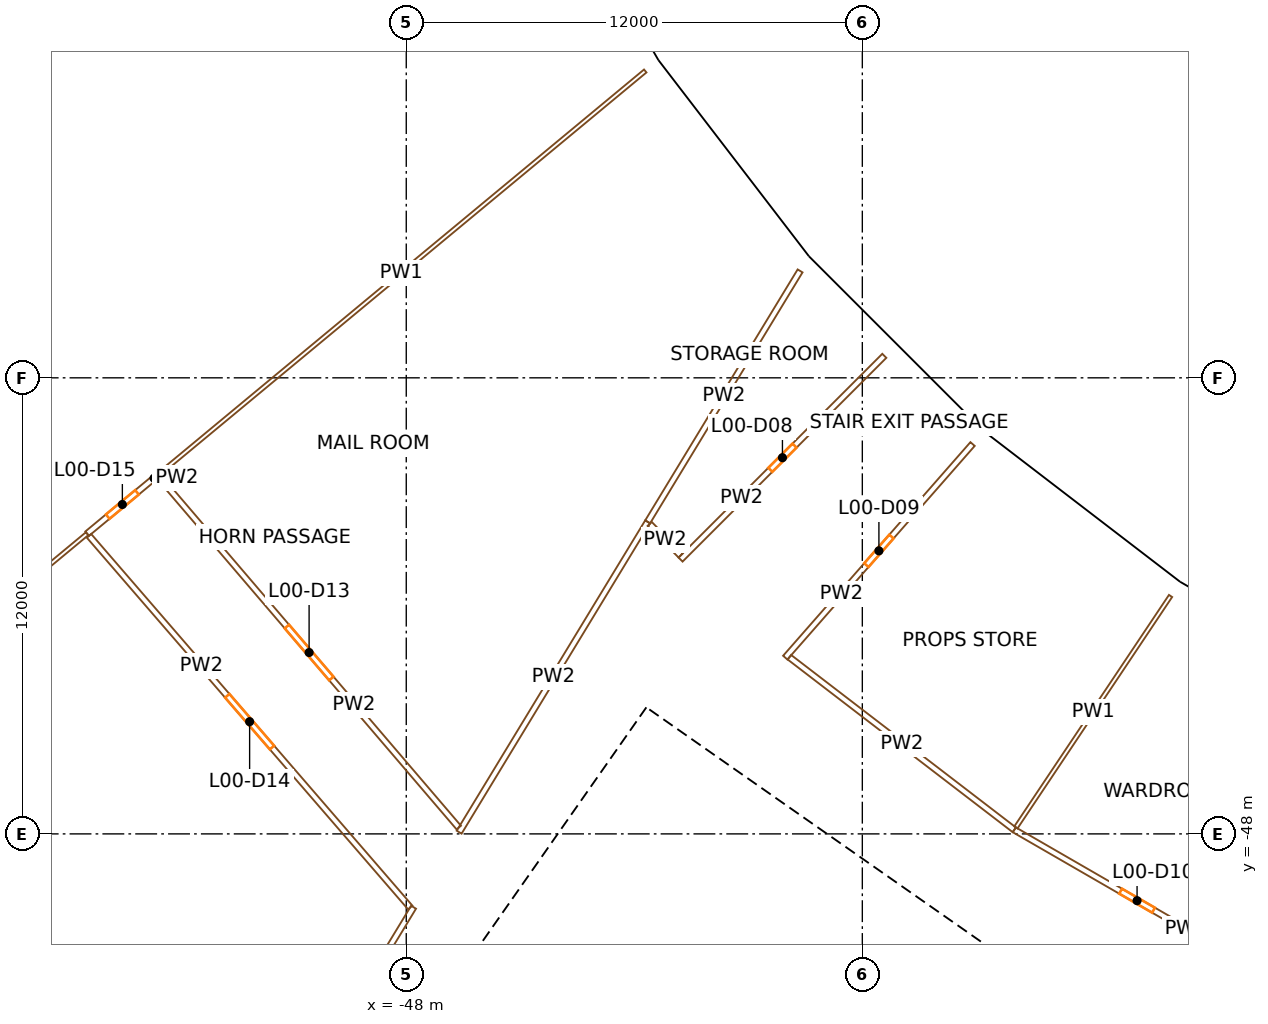
"""IFC4 building model, lengths in metres.
Left out: names, types, materials, properties, quantities, classifications, styles, units other than length and angle.
Written with IfcOpenShell. Run it as: python <this file> out.ifc"""

import sys

from ifc_helpers import new_model, si_unit, direction, frame, frame_2d, origin, origin_2d, place, context, subcontext, project, spatial, rectangle, extrude, element, fill, save


model = new_model("IFC4")
c1 = context("Model", 3, precision=1e-05, world=origin(), true_north=direction((0.0, 1.0)))
c2 = subcontext(c1, "Body", "Model", "MODEL_VIEW")
j1 = project(units=[si_unit("LENGTHUNIT", "METRE"), si_unit("PLANEANGLEUNIT", "RADIAN")], contexts=[c1])
p1 = place(None, origin())
s1 = spatial("IfcSite", under=j1, at=p1, CompositionType="ELEMENT")
p2 = place(p1, origin())
s2 = spatial("IfcBuilding", under=s1, at=p2, CompositionType="ELEMENT")
p3 = place(p2, origin())
s3 = spatial("IfcBuildingStorey", under=s2, at=p3, CompositionType="ELEMENT", Elevation=0.0)
p4 = place(p3, frame((-42.197, -28.195, -0.4), z_axis=(0.0, 0.0, 1.0), x_axis=(0.55557023302, -0.831469612303, 0.0)))
e1 = element("IfcColumn", 1, at=p4, inside=s3, PredefinedType="COLUMN", context=c2, shape_type="SweptSolid", body=[
    extrude(rectangle(XDim=1.1, YDim=1.3, at=origin_2d()), origin(), (0.0, 0.0, 1.0), 9.4),
])
p5 = place(p3, frame((-48.433, -32.362, -0.4), z_axis=(0.0, 0.0, 1.0), x_axis=(0.55557023302, -0.831469612303, 0.0)))
e2 = element("IfcColumn", 2, at=p5, inside=s3, PredefinedType="COLUMN", context=c2, shape_type="SweptSolid", body=[
    extrude(rectangle(XDim=1.4, YDim=1.8, at=origin_2d()), origin(), (0.0, 0.0, 1.0), 9.4),
])
p6 = place(p3, frame((-38.156, -33.462, -0.4), z_axis=(0.0, 0.0, 1.0), x_axis=(0.6593458151, -0.751839807479, 0.0)))
e3 = element("IfcColumn", 3, at=p6, inside=s3, PredefinedType="COLUMN", context=c2, shape_type="SweptSolid", body=[
    extrude(rectangle(XDim=1.1, YDim=1.3, at=origin_2d()), origin(), (0.0, 0.0, 1.0), 9.4),
])
for number, where, z_axis, x_axis in (
    (4, (-43.795, -38.407, -0.4), (0.0, 0.0, 1.0), (0.659, -0.752, 0.0)),
    (5, (-58.456, -51.264, -0.4), (0.0, 0.0, 1.0), (0.659, -0.752, 0.0)),
):
    element("IfcColumn", number, at=place(p3, frame(where, z_axis=z_axis, x_axis=x_axis)), inside=s3, PredefinedType="COLUMN", context=c2, shape_type="SweptSolid", body=[
        extrude(rectangle(XDim=1.4, YDim=1.8, at=origin_2d()), origin(), (0.0, 0.0, 1.0), 9.4),
    ])
p7 = place(p3, frame((-33.462, -38.156, -0.4), z_axis=(0.0, 0.0, 1.0), x_axis=(0.751839807479, -0.6593458151, 0.0)))
e6 = element("IfcColumn", 6, at=p7, inside=s3, PredefinedType="COLUMN", context=c2, shape_type="SweptSolid", body=[
    extrude(rectangle(XDim=1.1, YDim=1.3, at=origin_2d()), origin(), (0.0, 0.0, 1.0), 9.4),
])
p8 = place(p3, frame((-38.407, -43.795, -0.4), z_axis=(0.0, 0.0, 1.0), x_axis=(0.751839807479, -0.6593458151, 0.0)))
e7 = element("IfcColumn", 7, at=p8, inside=s3, PredefinedType="COLUMN", context=c2, shape_type="SweptSolid", body=[
    extrude(rectangle(XDim=1.4, YDim=1.8, at=origin_2d()), origin(), (0.0, 0.0, 1.0), 9.4),
])
p9 = place(p3, frame((-28.195, -42.197, -0.4), z_axis=(0.0, 0.0, 1.0), x_axis=(0.831469612303, -0.55557023302, 0.0)))
e8 = element("IfcColumn", 8, at=p9, inside=s3, PredefinedType="COLUMN", context=c2, shape_type="SweptSolid", body=[
    extrude(rectangle(XDim=1.1, YDim=1.3, at=origin_2d()), origin(), (0.0, 0.0, 1.0), 9.4),
])
p10 = place(p3, frame((-32.362, -48.433, -0.4), z_axis=(0.0, 0.0, 1.0), x_axis=(0.831469612303, -0.55557023302, 0.0)))
e9 = element("IfcColumn", 9, at=p10, inside=s3, PredefinedType="COLUMN", context=c2, shape_type="SweptSolid", body=[
    extrude(rectangle(XDim=1.4, YDim=1.8, at=origin_2d()), origin(), (0.0, 0.0, 1.0), 9.4),
])
p11 = place(p3, frame((-49.779, -57.191, 0.0), z_axis=(0.0, 0.0, 1.0), x_axis=(0.573577477574, 0.819151315216, 0.0)))
e10 = element("IfcWall", 10, at=p11, inside=s3, PredefinedType="SHEAR", context=c2, shape_type="SweptSolid", body=[
    extrude(rectangle(XDim=14.8, YDim=0.9, at=frame_2d((7.4, 0.0))), origin(), (0.0, 0.0, 1.0), 8.6),
])
p12 = place(p11, frame((6.7, 0.0, 0.0)))
e11 = element("IfcOpeningElement", 11, at=p12, cuts=e10, PredefinedType="OPENING", context=c2, shape_type="SweptSolid", body=[
    extrude(rectangle(XDim=1.4, YDim=2.1, at=frame_2d((0.7, 1.05))), frame((0.0, 0.46, 0.0), z_axis=(0.0, -1.0, 0.0), x_axis=(1.0, 0.0, 0.0)), (0.0, 0.0, 1.0), 0.92),
])
p13 = place(p3, frame((-28.854, -54.324, 0.0), z_axis=(0.0, 0.0, 1.0), x_axis=(-0.819145767589, 0.573585400304, 0.0)))
e12 = element("IfcWall", 12, at=p13, inside=s3, PredefinedType="SHEAR", context=c2, shape_type="SweptSolid", body=[
    extrude(rectangle(XDim=15.045, YDim=0.9, at=frame_2d((7.523, 0.0))), origin(), (0.0, 0.0, 1.0), 8.6),
])
p14 = place(p13, frame((0.85, 0.0, 0.0)))
e13 = element("IfcOpeningElement", 13, at=p14, cuts=e12, PredefinedType="OPENING", context=c2, shape_type="SweptSolid", body=[
    extrude(rectangle(XDim=1.0, YDim=2.1, at=frame_2d((0.5, 1.05))), frame((0.0, 0.46, 0.0), z_axis=(0.0, -1.0, 0.0), x_axis=(1.0, 0.0, 0.0)), (0.0, 0.0, 1.0), 0.92),
])
p15 = place(p13, frame((3.575, 0.0, 0.0)))
e14 = element("IfcOpeningElement", 14, at=p15, cuts=e12, PredefinedType="OPENING", context=c2, shape_type="SweptSolid", body=[
    extrude(rectangle(XDim=1.0, YDim=2.1, at=frame_2d((0.5, 1.05))), frame((0.0, 0.46, 0.0), z_axis=(0.0, -1.0, 0.0), x_axis=(1.0, 0.0, 0.0)), (0.0, 0.0, 1.0), 0.92),
])
p16 = place(p13, frame((6.275, 0.0, 0.0)))
e15 = element("IfcOpeningElement", 15, at=p16, cuts=e12, PredefinedType="OPENING", context=c2, shape_type="SweptSolid", body=[
    extrude(rectangle(XDim=0.9, YDim=2.1, at=frame_2d((0.45, 1.05))), frame((0.0, 0.46, 0.0), z_axis=(0.0, -1.0, 0.0), x_axis=(1.0, 0.0, 0.0)), (0.0, 0.0, 1.0), 0.92),
])
p17 = place(p13, frame((13.495, 0.0, 0.0)))
e16 = element("IfcOpeningElement", 16, at=p17, cuts=e12, PredefinedType="OPENING", context=c2, shape_type="SweptSolid", body=[
    extrude(rectangle(XDim=1.1, YDim=2.1, at=frame_2d((0.55, 1.05))), frame((0.0, 0.46, 0.0), z_axis=(0.0, -1.0, 0.0), x_axis=(1.0, 0.0, 0.0)), (0.0, 0.0, 1.0), 0.92),
])
p18 = place(p3, frame((-43.204, -60.696, 0.0), z_axis=(0.0, 0.0, 1.0), x_axis=(0.573571992966, 0.819155155563, 0.0)))
e17 = element("IfcWall", 17, at=p18, inside=s3, PredefinedType="SOLIDWALL", context=c2, shape_type="SweptSolid", body=[
    extrude(rectangle(XDim=13.0, YDim=0.3, at=frame_2d((6.5, 0.0))), origin(), (0.0, 0.0, 1.0), 8.6),
])
p19 = place(p3, frame((-37.936, -52.91, 0.0), z_axis=(0.0, 0.0, 1.0), x_axis=(-0.819147518138, 0.57358290031, 0.0)))
e18 = element("IfcWall", 18, at=p19, inside=s3, PredefinedType="SOLIDWALL", context=c2, shape_type="SweptSolid", body=[
    extrude(rectangle(XDim=6.795, YDim=0.3, at=frame_2d((3.398, 0.0))), origin(), (0.0, 0.0, 1.0), 8.6),
])
p20 = place(p19, frame((5.32, 0.0, 0.0)))
e19 = element("IfcOpeningElement", 19, at=p20, cuts=e18, PredefinedType="OPENING", context=c2, shape_type="SweptSolid", body=[
    extrude(rectangle(XDim=1.1, YDim=2.1, at=frame_2d((0.55, 1.05))), frame((0.0, 0.16, 0.0), z_axis=(0.0, -1.0, 0.0), x_axis=(1.0, 0.0, 0.0)), (0.0, 0.0, 1.0), 0.32),
])
p21 = place(p3, frame((-41.587, -48.369, 0.0), z_axis=(0.0, 0.0, 1.0), x_axis=(0.573495128918, 0.819208970354, 0.0)))
e20 = element("IfcWall", 20, at=p21, inside=s3, PredefinedType="SOLIDWALL", context=c2, shape_type="SweptSolid", body=[
    extrude(rectangle(XDim=0.5, YDim=0.3, at=frame_2d((0.25, 0.0))), origin(), (0.0, 0.0, 1.0), 4.3),
])
p22 = place(p3, frame((-41.583, -27.714, 0.0), z_axis=(0.0, 0.0, 1.0), x_axis=(-0.50000447882, 0.866022817921, 0.0)))
e21 = element("IfcWall", 21, at=p22, inside=s3, PredefinedType="SOLIDWALL", context=c2, shape_type="SweptSolid", body=[
    extrude(rectangle(XDim=6.419, YDim=0.45, at=frame_2d((3.21, 0.0))), origin(), (0.0, 0.0, 1.0), 7.7),
])
p23 = place(p3, frame((-37.555, -32.975, 0.0), z_axis=(0.0, 0.0, 1.0), x_axis=(-0.608780327927, 0.793338838284, 0.0)))
e22 = element("IfcWall", 22, at=p23, inside=s3, PredefinedType="SOLIDWALL", context=c2, shape_type="SweptSolid", body=[
    extrude(rectangle(XDim=6.597, YDim=0.45, at=frame_2d((3.298, 0.0))), origin(), (0.0, 0.0, 1.0), 7.7),
])
p24 = place(p23, frame((2.398, 0.0, 0.0)))
e23 = element("IfcOpeningElement", 23, at=p24, cuts=e22, PredefinedType="OPENING", context=c2, shape_type="SweptSolid", body=[
    extrude(rectangle(XDim=1.8, YDim=2.4, at=frame_2d((0.9, 1.2))), frame((0.0, 0.235, 0.0), z_axis=(0.0, -1.0, 0.0), x_axis=(1.0, 0.0, 0.0)), (0.0, 0.0, 1.0), 0.47),
])
p25 = place(p3, frame((-32.993, -37.532, 0.0), z_axis=(0.0, 0.0, 1.0), x_axis=(-0.707106781187, 0.707106781187, 0.0)))
e24 = element("IfcWall", 24, at=p25, inside=s3, PredefinedType="SOLIDWALL", context=c2, shape_type="SweptSolid", body=[
    extrude(rectangle(XDim=6.419, YDim=0.45, at=frame_2d((3.209, 0.0))), origin(), (0.0, 0.0, 1.0), 7.7),
])
p26 = place(p25, frame((1.679, 0.0, 0.0), z_axis=(0.0, 0.0, 1.0), x_axis=(-1.0, 0.0, 0.0)))
e25 = element("IfcOpeningElement", 25, at=p26, cuts=e24, PredefinedType="OPENING", context=c2, shape_type="SweptSolid", body=[
    extrude(rectangle(XDim=1.2, YDim=2.4, at=frame_2d((0.6, 1.2))), frame((0.0, 0.235, 0.0), z_axis=(0.0, -1.0, 0.0), x_axis=(1.0, 0.0, 0.0)), (0.0, 0.0, 1.0), 0.47),
])
p27 = place(p3, frame((-27.741, -41.571, 0.0), z_axis=(0.0, 0.0, 1.0), x_axis=(-0.793338838284, 0.608780327927, 0.0)))
e26 = element("IfcWall", 26, at=p27, inside=s3, PredefinedType="SOLIDWALL", context=c2, shape_type="SweptSolid", body=[
    extrude(rectangle(XDim=6.597, YDim=0.45, at=frame_2d((3.298, 0.0))), origin(), (0.0, 0.0, 1.0), 7.7),
])
p28 = place(p27, frame((2.398, 0.0, 0.0)))
e27 = element("IfcOpeningElement", 27, at=p28, cuts=e26, PredefinedType="OPENING", context=c2, shape_type="SweptSolid", body=[
    extrude(rectangle(XDim=1.8, YDim=2.4, at=frame_2d((0.9, 1.2))), frame((0.0, 0.235, 0.0), z_axis=(0.0, -1.0, 0.0), x_axis=(1.0, 0.0, 0.0)), (0.0, 0.0, 1.0), 0.47),
])
p29 = place(p3, frame((-22.155, -44.792, 0.0), z_axis=(0.0, 0.0, 1.0), x_axis=(-0.866022817921, 0.50000447882, 0.0)))
e28 = element("IfcWall", 28, at=p29, inside=s3, PredefinedType="SOLIDWALL", context=c2, shape_type="SweptSolid", body=[
    extrude(rectangle(XDim=6.419, YDim=0.45, at=frame_2d((3.21, 0.0))), origin(), (0.0, 0.0, 1.0), 7.7),
])
p30 = place(p3, frame((-69.078, -50.614, 0.0), z_axis=(0.0, 0.0, 1.0), x_axis=(0.769847826177, 0.638227486505, 0.0)))
e29 = element("IfcWall", 29, at=p30, inside=s3, PredefinedType="PARTITIONING", context=c2, shape_type="SweptSolid", body=[
    extrude(rectangle(XDim=16.473, YDim=0.1, at=frame_2d((8.237, 0.0))), origin(), (0.0, 0.0, 1.0), 7.6),
])
p31 = place(p3, frame((-56.396, -40.101, 0.0), z_axis=(0.0, 0.0, 1.0), x_axis=(0.769873446727, 0.63819658102, 0.0)))
e30 = element("IfcWall", 30, at=p31, inside=s3, PredefinedType="PARTITIONING", context=c2, shape_type="SweptSolid", body=[
    extrude(rectangle(XDim=2.406, YDim=0.15, at=frame_2d((1.203, 0.0))), origin(), (0.0, 0.0, 1.0), 7.6),
])
p32 = place(p31, frame((0.703, 0.0, 0.0)))
e31 = element("IfcOpeningElement", 31, at=p32, cuts=e30, PredefinedType="OPENING", context=c2, shape_type="SweptSolid", body=[
    extrude(rectangle(XDim=1.0, YDim=2.1, at=frame_2d((0.5, 1.05))), frame((0.0, 0.085, 0.0), z_axis=(0.0, -1.0, 0.0), x_axis=(1.0, 0.0, 0.0)), (0.0, 0.0, 1.0), 0.17),
])
p33 = place(p3, frame((-54.544, -38.565, 0.0), z_axis=(0.0, 0.0, 1.0), x_axis=(0.769842038591, 0.638234467589, 0.0)))
e32 = element("IfcWall", 32, at=p33, inside=s3, PredefinedType="PARTITIONING", context=c2, shape_type="SweptSolid", body=[
    extrude(rectangle(XDim=16.668, YDim=0.1, at=frame_2d((8.334, 0.0))), origin(), (0.0, 0.0, 1.0), 7.6),
])
p34 = place(p3, frame((-47.896, -49.937, 0.0), z_axis=(0.0, 0.0, 1.0), x_axis=(-0.653903077734, 0.756578327029, 0.0)))
e33 = element("IfcWall", 33, at=p34, inside=s3, PredefinedType="PARTITIONING", context=c2, shape_type="SweptSolid", body=[
    extrude(rectangle(XDim=12.926, YDim=0.15, at=frame_2d((6.463, 0.0))), origin(), (0.0, 0.0, 1.0), 7.6),
])
p35 = place(p34, frame((5.563, 0.0, 0.0)))
e34 = element("IfcOpeningElement", 34, at=p35, cuts=e33, PredefinedType="OPENING", context=c2, shape_type="SweptSolid", body=[
    extrude(rectangle(XDim=1.8, YDim=2.1, at=frame_2d((0.9, 1.05))), frame((0.0, 0.085, 0.0), z_axis=(0.0, -1.0, 0.0), x_axis=(1.0, 0.0, 0.0)), (0.0, 0.0, 1.0), 0.17),
])
p36 = place(p3, frame((-47.808, -49.929, 0.0), z_axis=(0.0, 0.0, 1.0), x_axis=(-0.51915296508, -0.854681343454, 0.0)))
e35 = element("IfcWall", 35, at=p36, inside=s3, PredefinedType="PARTITIONING", context=c2, shape_type="SweptSolid", body=[
    extrude(rectangle(XDim=9.875, YDim=0.15, at=frame_2d((4.938, 0.0))), origin(), (0.0, 0.0, 1.0), 7.6),
])
p37 = place(p3, frame((-54.495, -38.622, 0.0), z_axis=(0.0, 0.0, 1.0), x_axis=(0.649856980775, -0.760056514042, 0.0)))
e36 = element("IfcWall", 36, at=p37, inside=s3, PredefinedType="PARTITIONING", context=c2, shape_type="SweptSolid", body=[
    extrude(rectangle(XDim=12.121, YDim=0.15, at=frame_2d((6.06, 0.0))), origin(), (0.0, 0.0, 1.0), 7.6),
])
p38 = place(p37, frame((5.16, 0.0, 0.0)))
e37 = element("IfcOpeningElement", 37, at=p38, cuts=e36, PredefinedType="OPENING", context=c2, shape_type="SweptSolid", body=[
    extrude(rectangle(XDim=1.8, YDim=2.1, at=frame_2d((0.9, 1.05))), frame((0.0, 0.085, 0.0), z_axis=(0.0, -1.0, 0.0), x_axis=(1.0, 0.0, 0.0)), (0.0, 0.0, 1.0), 0.17),
])
p39 = place(p3, frame((-41.648, -39.789, 0.0), z_axis=(0.0, 0.0, 1.0), x_axis=(-0.519144162426, -0.854686690325, 0.0)))
e38 = element("IfcWall", 38, at=p39, inside=s3, PredefinedType="PARTITIONING", context=c2, shape_type="SweptSolid", body=[
    extrude(rectangle(XDim=9.554, YDim=0.15, at=frame_2d((4.777, 0.0))), origin(), (0.0, 0.0, 1.0), 7.6),
])
p40 = place(p3, frame((-41.596, -39.843, 0.0), z_axis=(0.0, 0.0, 1.0), x_axis=(0.698989001302, -0.715132418548, 0.0)))
e39 = element("IfcWall", 39, at=p40, inside=s3, PredefinedType="PARTITIONING", context=c2, shape_type="SweptSolid", body=[
    extrude(rectangle(XDim=1.165, YDim=0.15, at=frame_2d((0.582, 0.0))), origin(), (0.0, 0.0, 1.0), 7.6),
])
p41 = place(p3, frame((-37.919, -43.352, 0.0), z_axis=(0.0, 0.0, 1.0), x_axis=(0.793353438114, -0.608761301523, 0.0)))
e40 = element("IfcWall", 40, at=p41, inside=s3, PredefinedType="PARTITIONING", context=c2, shape_type="SweptSolid", body=[
    extrude(rectangle(XDim=7.459, YDim=0.15, at=frame_2d((3.73, 0.0))), origin(), (0.0, 0.0, 1.0), 7.6),
])
p42 = place(p3, frame((-37.638, -33.187, 0.0), z_axis=(0.0, 0.0, 1.0), x_axis=(-0.519163683086, -0.854674833, 0.0)))
e41 = element("IfcWall", 41, at=p42, inside=s3, PredefinedType="PARTITIONING", context=c2, shape_type="SweptSolid", body=[
    extrude(rectangle(XDim=7.725, YDim=0.15, at=frame_2d((3.862, 0.0))), origin(), (0.0, 0.0, 1.0), 7.6),
])
p43 = place(p3, frame((-40.782, -40.782, 0.0), z_axis=(0.0, 0.0, 1.0), x_axis=(0.707106781187, 0.707106781187, 0.0)))
e42 = element("IfcWall", 42, at=p43, inside=s3, PredefinedType="PARTITIONING", context=c2, shape_type="SweptSolid", body=[
    extrude(rectangle(XDim=7.582, YDim=0.15, at=frame_2d((3.791, 0.0))), origin(), (0.0, 0.0, 1.0), 7.6),
])
p44 = place(p43, frame((3.341, 0.0, 0.0)))
e43 = element("IfcOpeningElement", 43, at=p44, cuts=e42, PredefinedType="OPENING", context=c2, shape_type="SweptSolid", body=[
    extrude(rectangle(XDim=0.9, YDim=2.1, at=frame_2d((0.45, 1.05))), frame((0.0, 0.085, 0.0), z_axis=(0.0, -1.0, 0.0), x_axis=(1.0, 0.0, 0.0)), (0.0, 0.0, 1.0), 0.17),
])
p45 = place(p3, frame((-33.099, -37.742, 0.0), z_axis=(0.0, 0.0, 1.0), x_axis=(-0.659362039417, -0.751825578826, 0.0)))
e44 = element("IfcWall", 44, at=p45, inside=s3, PredefinedType="PARTITIONING", context=c2, shape_type="SweptSolid", body=[
    extrude(rectangle(XDim=7.475, YDim=0.15, at=frame_2d((3.737, 0.0))), origin(), (0.0, 0.0, 1.0), 7.6),
])
p46 = place(p45, frame((3.238, 0.0, 0.0)))
e45 = element("IfcOpeningElement", 45, at=p46, cuts=e44, PredefinedType="OPENING", context=c2, shape_type="SweptSolid", body=[
    extrude(rectangle(XDim=1.0, YDim=2.1, at=frame_2d((0.5, 1.05))), frame((0.0, 0.085, 0.0), z_axis=(0.0, -1.0, 0.0), x_axis=(1.0, 0.0, 0.0)), (0.0, 0.0, 1.0), 0.17),
])
p47 = place(p3, frame((-32.001, -47.893, 0.0), z_axis=(0.0, 0.0, 1.0), x_axis=(0.866020983744, -0.500007655656, 0.0)))
e46 = element("IfcWall", 46, at=p47, inside=s3, PredefinedType="PARTITIONING", context=c2, shape_type="SweptSolid", body=[
    extrude(rectangle(XDim=7.459, YDim=0.15, at=frame_2d((3.73, 0.0))), origin(), (0.0, 0.0, 1.0), 7.6),
])
p48 = place(p47, frame((3.23, 0.0, 0.0)))
e47 = element("IfcOpeningElement", 47, at=p48, cuts=e46, PredefinedType="OPENING", context=c2, shape_type="SweptSolid", body=[
    extrude(rectangle(XDim=1.0, YDim=2.1, at=frame_2d((0.5, 1.05))), frame((0.0, 0.085, 0.0), z_axis=(0.0, -1.0, 0.0), x_axis=(1.0, 0.0, 0.0)), (0.0, 0.0, 1.0), 0.17),
])
p49 = place(p3, frame((-27.89, -41.74, 0.0), z_axis=(0.0, 0.0, 1.0), x_axis=(-0.555569023768, -0.831470420297, 0.0)))
e48 = element("IfcWall", 48, at=p49, inside=s3, PredefinedType="PARTITIONING", context=c2, shape_type="SweptSolid", body=[
    extrude(rectangle(XDim=7.325, YDim=0.1, at=frame_2d((3.663, 0.0))), origin(), (0.0, 0.0, 1.0), 7.6),
])
p50 = place(p16, origin())
e49 = element("IfcDoor", 49, at=p50, inside=s3, OperationType="SINGLE_SWING_LEFT", PredefinedType="DOOR", context=c2, shape_type="SweptSolid", body=[
    extrude(rectangle(XDim=0.9, YDim=2.1, at=frame_2d((0.45, 1.05))), frame((0.0, 0.025, 0.0), z_axis=(0.0, -1.0, 0.0), x_axis=(1.0, 0.0, 0.0)), (0.0, 0.0, 1.0), 0.05),
])
fill(e15, e49)
p51 = place(p12, origin())
e50 = element("IfcDoor", 50, at=p51, inside=s3, OperationType="DOUBLE_DOOR_SINGLE_SWING", PredefinedType="DOOR", context=c2, shape_type="SweptSolid", body=[
    extrude(rectangle(XDim=1.4, YDim=2.1, at=frame_2d((0.7, 1.05))), frame((0.0, 0.025, 0.0), z_axis=(0.0, -1.0, 0.0), x_axis=(1.0, 0.0, 0.0)), (0.0, 0.0, 1.0), 0.05),
])
fill(e11, e50)
p52 = place(p17, origin())
e51 = element("IfcDoor", 51, at=p52, inside=s3, OperationType="SINGLE_SWING_RIGHT", PredefinedType="DOOR", context=c2, shape_type="SweptSolid", body=[
    extrude(rectangle(XDim=1.1, YDim=2.1, at=frame_2d((0.55, 1.05))), frame((0.0, 0.025, 0.0), z_axis=(0.0, -1.0, 0.0), x_axis=(1.0, 0.0, 0.0)), (0.0, 0.0, 1.0), 0.05),
])
fill(e16, e51)
p53 = place(p20, origin())
e52 = element("IfcDoor", 52, at=p53, inside=s3, OperationType="SINGLE_SWING_LEFT", PredefinedType="DOOR", context=c2, shape_type="SweptSolid", body=[
    extrude(rectangle(XDim=1.1, YDim=2.1, at=frame_2d((0.55, 1.05))), frame((0.0, 0.025, 0.0), z_axis=(0.0, -1.0, 0.0), x_axis=(1.0, 0.0, 0.0)), (0.0, 0.0, 1.0), 0.05),
])
fill(e19, e52)
p54 = place(p26, origin())
e53 = element("IfcDoor", 53, at=p54, inside=s3, OperationType="SINGLE_SWING_LEFT", PredefinedType="DOOR", context=c2, shape_type="SweptSolid", body=[
    extrude(rectangle(XDim=1.2, YDim=2.4, at=frame_2d((0.6, 1.2))), frame((0.0, 0.025, 0.0), z_axis=(0.0, -1.0, 0.0), x_axis=(1.0, 0.0, 0.0)), (0.0, 0.0, 1.0), 0.05),
])
fill(e25, e53)
p55 = place(p24, origin())
e54 = element("IfcDoor", 54, at=p55, inside=s3, OperationType="DOUBLE_DOOR_DOUBLE_SWING", PredefinedType="DOOR", context=c2, shape_type="SweptSolid", body=[
    extrude(rectangle(XDim=1.8, YDim=2.4, at=frame_2d((0.9, 1.2))), frame((0.0, 0.025, 0.0), z_axis=(0.0, -1.0, 0.0), x_axis=(1.0, 0.0, 0.0)), (0.0, 0.0, 1.0), 0.05),
])
fill(e23, e54)
p56 = place(p28, origin())
e55 = element("IfcDoor", 55, at=p56, inside=s3, OperationType="DOUBLE_DOOR_DOUBLE_SWING", PredefinedType="DOOR", context=c2, shape_type="SweptSolid", body=[
    extrude(rectangle(XDim=1.8, YDim=2.4, at=frame_2d((0.9, 1.2))), frame((0.0, 0.025, 0.0), z_axis=(0.0, -1.0, 0.0), x_axis=(1.0, 0.0, 0.0)), (0.0, 0.0, 1.0), 0.05),
])
fill(e27, e55)
p57 = place(p44, origin())
e56 = element("IfcDoor", 56, at=p57, inside=s3, OperationType="SINGLE_SWING_RIGHT", PredefinedType="DOOR", context=c2, shape_type="SweptSolid", body=[
    extrude(rectangle(XDim=0.9, YDim=2.1, at=frame_2d((0.45, 1.05))), frame((0.0, 0.025, 0.0), z_axis=(0.0, -1.0, 0.0), x_axis=(1.0, 0.0, 0.0)), (0.0, 0.0, 1.0), 0.05),
])
fill(e43, e56)
p58 = place(p46, origin())
e57 = element("IfcDoor", 57, at=p58, inside=s3, OperationType="SINGLE_SWING_RIGHT", PredefinedType="DOOR", context=c2, shape_type="SweptSolid", body=[
    extrude(rectangle(XDim=1.0, YDim=2.1, at=frame_2d((0.5, 1.05))), frame((0.0, 0.025, 0.0), z_axis=(0.0, -1.0, 0.0), x_axis=(1.0, 0.0, 0.0)), (0.0, 0.0, 1.0), 0.05),
])
fill(e45, e57)
p59 = place(p48, origin())
e58 = element("IfcDoor", 58, at=p59, inside=s3, OperationType="SINGLE_SWING_RIGHT", PredefinedType="DOOR", context=c2, shape_type="SweptSolid", body=[
    extrude(rectangle(XDim=1.0, YDim=2.1, at=frame_2d((0.5, 1.05))), frame((0.0, 0.025, 0.0), z_axis=(0.0, -1.0, 0.0), x_axis=(1.0, 0.0, 0.0)), (0.0, 0.0, 1.0), 0.05),
])
fill(e47, e58)
p60 = place(p38, origin())
e59 = element("IfcDoor", 59, at=p60, inside=s3, OperationType="DOUBLE_DOOR_SINGLE_SWING", PredefinedType="DOOR", context=c2, shape_type="SweptSolid", body=[
    extrude(rectangle(XDim=1.8, YDim=2.1, at=frame_2d((0.9, 1.05))), frame((0.0, 0.025, 0.0), z_axis=(0.0, -1.0, 0.0), x_axis=(1.0, 0.0, 0.0)), (0.0, 0.0, 1.0), 0.05),
])
fill(e37, e59)
p61 = place(p35, origin())
e60 = element("IfcDoor", 60, at=p61, inside=s3, OperationType="DOUBLE_DOOR_SINGLE_SWING", PredefinedType="DOOR", context=c2, shape_type="SweptSolid", body=[
    extrude(rectangle(XDim=1.8, YDim=2.1, at=frame_2d((0.9, 1.05))), frame((0.0, 0.025, 0.0), z_axis=(0.0, -1.0, 0.0), x_axis=(1.0, 0.0, 0.0)), (0.0, 0.0, 1.0), 0.05),
])
fill(e34, e60)
p62 = place(p32, origin())
e61 = element("IfcDoor", 61, at=p62, inside=s3, OperationType="SINGLE_SWING_RIGHT", PredefinedType="DOOR", context=c2, shape_type="SweptSolid", body=[
    extrude(rectangle(XDim=1.0, YDim=2.1, at=frame_2d((0.5, 1.05))), frame((0.0, 0.025, 0.0), z_axis=(0.0, -1.0, 0.0), x_axis=(1.0, 0.0, 0.0)), (0.0, 0.0, 1.0), 0.05),
])
fill(e31, e61)
save(model, sys.argv[1])
